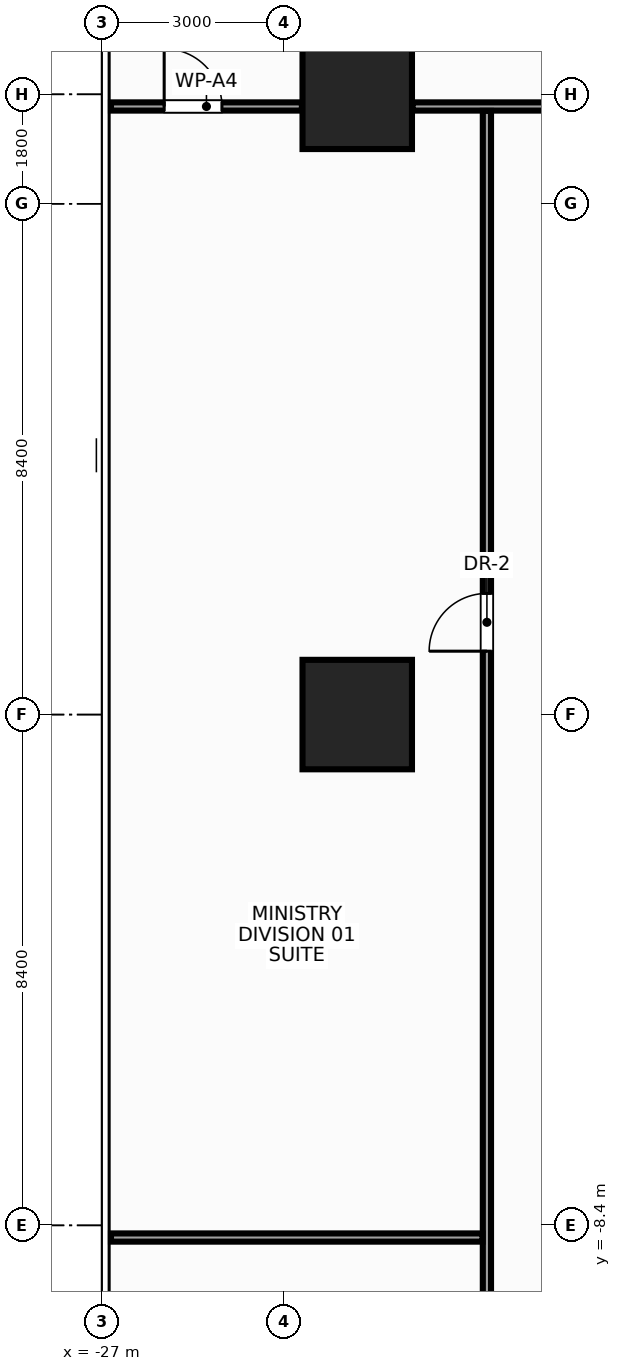
"""IFC4 building model, lengths in metres.
Left out: names, types, materials, properties, quantities, classifications, styles, units other than length and angle.
Written with IfcOpenShell. Run it as: python <this file> out.ifc"""

import sys

from ifc_helpers import new_model, si_unit, direction, frame, frame_2d, origin, origin_2d, place, context, subcontext, project, spatial, rectangle, extrude, source, transform, mapped, element, fill, save


model = new_model("IFC4")
c1 = context("Model", 3, precision=1e-05, world=origin(), true_north=direction((0.0, 1.0)))
c2 = subcontext(c1, "Body", "Model", "MODEL_VIEW")
j1 = project(units=[si_unit("LENGTHUNIT", "METRE"), si_unit("PLANEANGLEUNIT", "RADIAN")], contexts=[c1])
p1 = place(None, origin())
s1 = spatial("IfcSite", under=j1, at=p1, CompositionType="ELEMENT")
p2 = place(p1, origin())
s2 = spatial("IfcBuilding", under=s1, at=p2, CompositionType="ELEMENT")
p3 = place(p2, frame((0.0, 0.0, 41.6)))
s3 = spatial("IfcBuildingStorey", under=s2, at=p3, CompositionType="ELEMENT", Elevation=41.6)
m1 = source(origin(), c2, "Body", "SweptSolid", [
    extrude(rectangle(XDim=1.8, YDim=1.8, at=origin_2d()), origin(), (0.0, 0.0, 1.0), 3.6),
])
for number, where, z_axis, x_axis in (
    (1, (-22.8, 0.0, 0.0), (0.0, 0.0, 1.0), (1.0, 0.0, 0.0)),
    (2, (-22.8, 10.2, 0.0), (0.0, 0.0, 1.0), (1.0, 0.0, 0.0)),
):
    element("IfcColumn", number, at=place(p3, frame(where, z_axis=z_axis, x_axis=x_axis)), inside=s3, PredefinedType="COLUMN", context=c2, shape_type="MappedRepresentation", body=[
        mapped(m1, transform((0.0, 0.0, 0.0), x_axis=(1.0, 0.0, 0.0), y_axis=(0.0, 1.0, 0.0), z_axis=(0.0, 0.0, 1.0), scale=1.0)),
    ])
m2 = source(origin(), c2, "Body", "SweptSolid", [
    extrude(rectangle(XDim=3.14, YDim=0.135, at=frame_2d((1.57, 0.0))), origin(), (0.0, 0.0, 1.0), 2.435),
])
p4 = place(p3, frame((-26.85, 10.0, 0.0), z_axis=(0.0, 0.0, 1.0), x_axis=(1.0, 0.0, 0.0)))
e3 = element("IfcWall", 3, at=p4, inside=s3, PredefinedType="PARTITIONING", context=c2, shape_type="MappedRepresentation", body=[
    mapped(m2, transform((0.0, 0.0, 0.0), x_axis=(1.0, 0.0, 0.0), y_axis=(0.0, 1.0, 0.0), z_axis=(0.0, 0.0, 1.0), scale=1.0)),
])
p5 = place(p4, frame((0.875, 0.0, 0.0)))
e4 = element("IfcOpeningElement", 4, at=p5, cuts=e3, PredefinedType="OPENING", context=c2, shape_type="SweptSolid", body=[
    extrude(rectangle(XDim=0.95, YDim=2.15, at=frame_2d((0.475, 1.075))), frame((0.0, 0.08, 0.0), z_axis=(0.0, -1.0, 0.0), x_axis=(1.0, 0.0, 0.0)), (0.0, 0.0, 1.0), 0.159),
])
m3 = source(origin(), c2, "Body", "SweptSolid", [
    extrude(rectangle(XDim=4.18, YDim=0.135, at=frame_2d((2.09, 0.0))), origin(), (0.0, 0.0, 1.0), 2.745),
])
p6 = place(p3, frame((-21.89, 10.0, 0.0), z_axis=(0.0, 0.0, 1.0), x_axis=(1.0, 0.0, 0.0)))
e5 = element("IfcWall", 5, at=p6, inside=s3, PredefinedType="PARTITIONING", context=c2, shape_type="MappedRepresentation", body=[
    mapped(m3, transform((0.0, 0.0, 0.0), x_axis=(1.0, 0.0, 0.0), y_axis=(0.0, 1.0, 0.0), z_axis=(0.0, 0.0, 1.0), scale=1.0)),
])
m4 = source(origin(), c2, "Body", "SweptSolid", [
    extrude(rectangle(XDim=24.123, YDim=0.135, at=frame_2d((12.061, 0.0))), origin(), (0.0, 0.0, 1.0), 2.745),
])
p7 = place(p3, frame((-20.667, -14.195, 0.0), z_axis=(0.0, 0.0, 1.0), x_axis=(0.0, 1.0, 0.0)))
e6 = element("IfcWall", 6, at=p7, inside=s3, PredefinedType="PARTITIONING", context=c2, shape_type="MappedRepresentation", body=[
    mapped(m4, transform((0.0, 0.0, 0.0), x_axis=(1.0, 0.0, 0.0), y_axis=(0.0, 1.0, 0.0), z_axis=(0.0, 0.0, 1.0), scale=1.0)),
])
p8 = place(p7, frame((15.238, 0.0, 0.0)))
e7 = element("IfcOpeningElement", 7, at=p8, cuts=e6, PredefinedType="OPENING", context=c2, shape_type="SweptSolid", body=[
    extrude(rectangle(XDim=0.95, YDim=2.15, at=frame_2d((0.475, 1.075))), frame((0.0, 0.08, 0.0), z_axis=(0.0, -1.0, 0.0), x_axis=(1.0, 0.0, 0.0)), (0.0, 0.0, 1.0), 0.159),
])
p9 = place(p7, frame((1.249, 0.0, 0.0)))
e8 = element("IfcOpeningElement", 8, at=p9, cuts=e6, PredefinedType="OPENING", context=c2, shape_type="SweptSolid", body=[
    extrude(rectangle(XDim=0.95, YDim=2.15, at=frame_2d((0.475, 1.075))), frame((0.0, 0.08, 0.0), z_axis=(0.0, -1.0, 0.0), x_axis=(1.0, 0.0, 0.0)), (0.0, 0.0, 1.0), 0.159),
])
m5 = source(origin(), c2, "Body", "SweptSolid", [
    extrude(rectangle(XDim=6.11, YDim=0.135, at=frame_2d((3.055, 0.0))), origin(), (0.0, 0.0, 1.0), 2.745),
])
p10 = place(p3, frame((-26.85, -8.6, 0.0), z_axis=(0.0, 0.0, 1.0), x_axis=(1.0, 0.0, 0.0)))
e9 = element("IfcWall", 9, at=p10, inside=s3, PredefinedType="PARTITIONING", context=c2, shape_type="MappedRepresentation", body=[
    mapped(m5, transform((0.0, 0.0, 0.0), x_axis=(1.0, 0.0, 0.0), y_axis=(0.0, 1.0, 0.0), z_axis=(0.0, 0.0, 1.0), scale=1.0)),
])
m6 = source(origin(), c2, "Body", "SweptSolid", [
    extrude(rectangle(XDim=0.95, YDim=2.15, at=frame_2d((0.475, 1.075))), frame((0.0, 0.025, 0.0), z_axis=(0.0, -1.0, 0.0), x_axis=(1.0, 0.0, 0.0)), (0.0, 0.0, 1.0), 0.05),
])
p11 = place(p8, origin())
e10 = element("IfcDoor", 10, at=p11, inside=s3, OperationType="SINGLE_SWING_LEFT", PredefinedType="DOOR", context=c2, shape_type="MappedRepresentation", body=[
    mapped(m6, transform((0.0, 0.0, 0.0), x_axis=(1.0, 0.0, 0.0), y_axis=(0.0, 1.0, 0.0), z_axis=(0.0, 0.0, 1.0), scale=1.0)),
])
fill(e7, e10)
p12 = place(p5, origin())
e11 = element("IfcDoor", 11, at=p12, inside=s3, OperationType="SINGLE_SWING_LEFT", PredefinedType="DOOR", context=c2, shape_type="MappedRepresentation", body=[
    mapped(m6, transform((0.0, 0.0, 0.0), x_axis=(1.0, 0.0, 0.0), y_axis=(0.0, 1.0, 0.0), z_axis=(0.0, 0.0, 1.0), scale=1.0)),
])
fill(e4, e11)
save(model, sys.argv[1])
